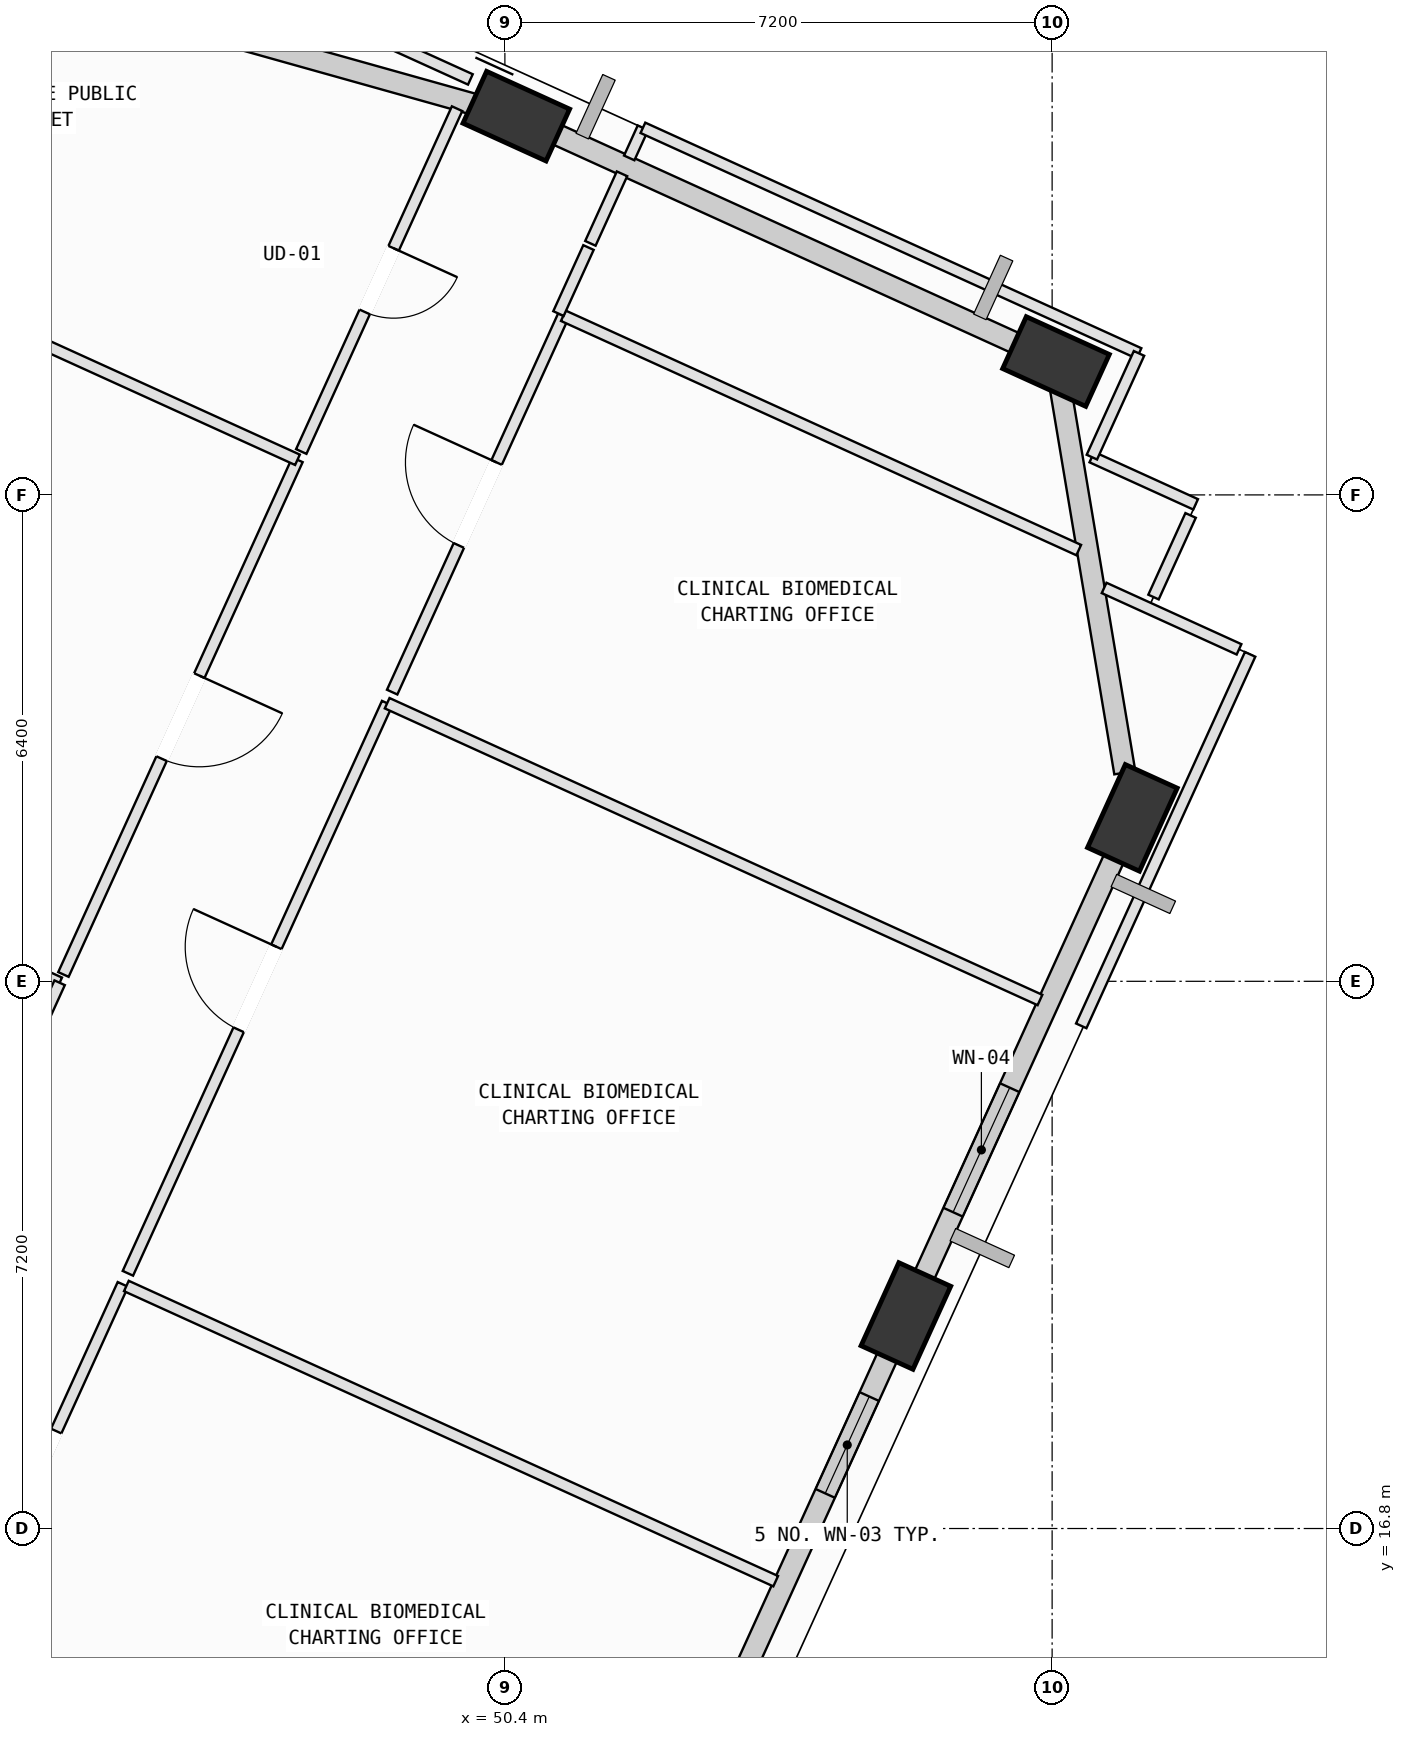
"""IFC4 building model, lengths in metres.
Left out: names, types, materials, properties, quantities, classifications, styles, units other than length and angle.
Written with IfcOpenShell. Run it as: python <this file> out.ifc"""

import sys

from ifc_helpers import new_model, si_unit, direction, frame, frame_2d, origin, origin_2d, place, context, subcontext, project, spatial, rectangle, extrude, element, fill, save


model = new_model("IFC4")
c1 = context("Model", 3, precision=1e-05, world=origin(), true_north=direction((0.0, 1.0)))
c2 = subcontext(c1, "Body", "Model", "MODEL_VIEW")
j1 = project(units=[si_unit("LENGTHUNIT", "METRE"), si_unit("PLANEANGLEUNIT", "RADIAN")], contexts=[c1])
p1 = place(None, origin())
s1 = spatial("IfcSite", under=j1, at=p1, CompositionType="ELEMENT")
p2 = place(p1, origin())
s2 = spatial("IfcBuilding", under=s1, at=p2, CompositionType="ELEMENT")
p3 = place(p2, frame((0.0, 0.0, 304.6)))
s3 = spatial("IfcBuildingStorey", under=s2, at=p3, CompositionType="ELEMENT", Elevation=304.6)
p4 = place(p3, frame((55.676, 19.596, 0.002), z_axis=(0.020720058133, 0.091230106706, 0.995614256036), x_axis=(-0.604352384833, -0.792152328195, 0.085163864882)))
e1 = element("IfcColumn", 1, at=p4, inside=s3, PredefinedType="COLUMN", context=c2, shape_type="SweptSolid", body=[
    extrude(rectangle(XDim=1.2, YDim=0.75, at=origin_2d()), origin(), (0.0, 0.0, 1.0), 3.947),
])
p5 = place(p3, frame((58.656, 26.151, 0.002), z_axis=(-0.006437366852, 0.103245460663, 0.994635076377), x_axis=(-0.356751992892, -0.929440786486, 0.094169209322)))
e2 = element("IfcColumn", 2, at=p5, inside=s3, PredefinedType="COLUMN", context=c2, shape_type="SweptSolid", body=[
    extrude(rectangle(XDim=1.2, YDim=0.75, at=origin_2d()), origin(), (0.0, 0.0, 1.0), 3.944),
])
p6 = place(p3, frame((57.651, 32.155, 0.002), z_axis=(-0.031104647589, 0.098930059692, 0.994608135995), x_axis=(0.991884646195, -0.119676409496, 0.042923253047)))
e3 = element("IfcColumn", 3, at=p6, inside=s3, PredefinedType="COLUMN", context=c2, shape_type="SweptSolid", body=[
    extrude(rectangle(XDim=1.2, YDim=0.75, at=origin_2d()), origin(), (0.0, 0.0, 1.0), 3.956),
])
p7 = place(p3, frame((50.55, 35.383, 0.002), z_axis=(-0.044259952808, 0.069657028792, 0.996588658834), x_axis=(0.989554992993, 0.140050346374, 0.034158693237)))
e4 = element("IfcColumn", 4, at=p7, inside=s3, PredefinedType="COLUMN", context=c2, shape_type="SweptSolid", body=[
    extrude(rectangle(XDim=1.2, YDim=0.75, at=origin_2d()), origin(), (0.0, 0.0, 1.0), 3.96),
])
p8 = place(p3, frame((55.588, 19.404, 0.0), z_axis=(0.0, 0.0, 1.0), x_axis=(-0.413909168945, -0.910318186055, 0.0)))
e5 = element("IfcWall", 5, at=p8, inside=s3, PredefinedType="SOLIDWALL", context=c2, shape_type="SweptSolid", body=[
    extrude(rectangle(XDim=6.407, YDim=0.28, at=frame_2d((3.203, 0.0))), origin(), (0.0, 0.0, 1.0), 3.265),
])
p9 = place(p8, frame((0.952, 0.0, 0.75)))
e6 = element("IfcOpeningElement", 6, at=p9, cuts=e5, PredefinedType="OPENING", context=c2, shape_type="SweptSolid", body=[
    extrude(rectangle(XDim=1.4, YDim=1.85, at=frame_2d((0.7, 0.925))), frame((0.0, 0.15, 0.0), z_axis=(0.0, -1.0, 0.0), x_axis=(1.0, 0.0, 0.0)), (0.0, 0.0, 1.0), 0.3),
])
p10 = place(p3, frame((58.573, 25.967, 0.0), z_axis=(0.0, 0.0, 1.0), x_axis=(-0.4139233057, -0.910311758135, 0.0)))
e7 = element("IfcWall", 7, at=p10, inside=s3, PredefinedType="SOLIDWALL", context=c2, shape_type="SweptSolid", body=[
    extrude(rectangle(XDim=6.418, YDim=0.28, at=frame_2d((3.209, 0.0))), origin(), (0.0, 0.0, 1.0), 3.265),
])
p11 = place(p10, frame((3.698, 0.0, 0.75)))
e8 = element("IfcOpeningElement", 8, at=p11, cuts=e7, PredefinedType="OPENING", context=c2, shape_type="SweptSolid", body=[
    extrude(rectangle(XDim=1.8, YDim=2.05, at=frame_2d((0.9, 1.025))), frame((0.0, 0.15, 0.0), z_axis=(0.0, -1.0, 0.0), x_axis=(1.0, 0.0, 0.0)), (0.0, 0.0, 1.0), 0.3),
])
p12 = place(p3, frame((57.682, 31.968, 0.0), z_axis=(0.0, 0.0, 1.0), x_axis=(0.165049562629, -0.986285274085, 0.0)))
e9 = element("IfcWall", 9, at=p12, inside=s3, PredefinedType="SOLIDWALL", context=c2, shape_type="SweptSolid", body=[
    extrude(rectangle(XDim=5.294, YDim=0.28, at=frame_2d((2.647, 0.0))), origin(), (0.0, 0.0, 1.0), 3.265),
])
p13 = place(p3, frame((50.777, 35.281, 0.0), z_axis=(0.0, 0.0, 1.0), x_axis=(0.910317820998, -0.413909971821, 0.0)))
e10 = element("IfcWall", 10, at=p13, inside=s3, PredefinedType="SOLIDWALL", context=c2, shape_type="SweptSolid", body=[
    extrude(rectangle(XDim=7.046, YDim=0.28, at=frame_2d((3.523, 0.0))), origin(), (0.0, 0.0, 1.0), 3.265),
])
p14 = place(p3, frame((41.363, 37.959, 0.0), z_axis=(0.0, 0.0, 1.0), x_axis=(0.962879231583, -0.269932557107, 0.0)))
e11 = element("IfcWall", 11, at=p14, inside=s3, PredefinedType="SOLIDWALL", context=c2, shape_type="SweptSolid", body=[
    extrude(rectangle(XDim=9.036, YDim=0.28, at=frame_2d((4.518, 0.0))), origin(), (0.0, 0.0, 1.0), 3.265),
])
p15 = place(p3, frame((43.123, 15.06, 0.0), z_axis=(0.0, 0.0, 1.0), x_axis=(0.413819852152, 0.910358791887, 0.0)))
e12 = element("IfcWall", 12, at=p15, inside=s3, PredefinedType="PARTITIONING", context=c2, shape_type="SweptSolid", body=[
    extrude(rectangle(XDim=5.439, YDim=0.15, at=frame_2d((2.72, 0.0))), origin(), (0.0, 0.0, 1.0), 3.78),
])
p16 = place(p15, frame((2.12, 0.0, 0.0)))
e13 = element("IfcOpeningElement", 13, at=p16, cuts=e12, PredefinedType="OPENING", context=c2, shape_type="SweptSolid", body=[
    extrude(rectangle(XDim=1.2, YDim=2.15, at=frame_2d((0.6, 1.075))), frame((0.0, 0.085, 0.0), z_axis=(0.0, -1.0, 0.0), x_axis=(1.0, 0.0, 0.0)), (0.0, 0.0, 1.0), 0.17),
])
p17 = place(p3, frame((45.42, 19.991, 0.0), z_axis=(0.0, 0.0, 1.0), x_axis=(0.910331727625, -0.413879385425, 0.0)))
e14 = element("IfcWall", 14, at=p17, inside=s3, PredefinedType="PARTITIONING", context=c2, shape_type="SweptSolid", body=[
    extrude(rectangle(XDim=9.385, YDim=0.15, at=frame_2d((4.692, 0.0))), origin(), (0.0, 0.0, 1.0), 3.78),
])
p18 = place(p3, frame((45.44, 20.158, 0.0), z_axis=(0.0, 0.0, 1.0), x_axis=(0.413963660089, 0.910293407713, 0.0)))
e15 = element("IfcWall", 15, at=p18, inside=s3, PredefinedType="PARTITIONING", context=c2, shape_type="SweptSolid", body=[
    extrude(rectangle(XDim=8.24, YDim=0.15, at=frame_2d((4.12, 0.0))), origin(), (0.0, 0.0, 1.0), 3.415),
])
p19 = place(p18, frame((3.52, 0.0, 0.0)))
e16 = element("IfcOpeningElement", 16, at=p19, cuts=e15, PredefinedType="OPENING", context=c2, shape_type="SweptSolid", body=[
    extrude(rectangle(XDim=1.2, YDim=2.15, at=frame_2d((0.6, 1.075))), frame((0.0, 0.085, 0.0), z_axis=(0.0, -1.0, 0.0), x_axis=(1.0, 0.0, 0.0)), (0.0, 0.0, 1.0), 0.17),
])
p20 = place(p3, frame((48.851, 27.659, 0.0), z_axis=(0.0, 0.0, 1.0), x_axis=(0.910326595448, -0.413890673513, 0.0)))
e17 = element("IfcWall", 17, at=p20, inside=s3, PredefinedType="PARTITIONING", context=c2, shape_type="SweptSolid", body=[
    extrude(rectangle(XDim=9.435, YDim=0.15, at=frame_2d((4.717, 0.0))), origin(), (0.0, 0.0, 1.0), 3.78),
])
p21 = place(p3, frame((56.125, 20.029, 0.0), z_axis=(0.0, 0.0, 1.0), x_axis=(-0.413988734236, -0.910282004615, 0.0)))
e18 = element("IfcWall", 18, at=p21, inside=s3, PredefinedType="PARTITIONING", context=c2, shape_type="SweptSolid", body=[
    extrude(rectangle(XDim=0.792, YDim=0.15, at=frame_2d((0.396, 0.0))), origin(), (0.0, 0.0, 1.0), 3.265),
])
p22 = place(p3, frame((48.917, 27.805, 0.0), z_axis=(0.0, 0.0, 1.0), x_axis=(0.413951711355, 0.910298841406, 0.0)))
e19 = element("IfcWall", 19, at=p22, inside=s3, PredefinedType="PARTITIONING", context=c2, shape_type="SweptSolid", body=[
    extrude(rectangle(XDim=5.44, YDim=0.15, at=frame_2d((2.72, 0.0))), origin(), (0.0, 0.0, 1.0), 3.78),
])
p23 = place(p22, frame((2.12, 0.0, 0.0)))
e20 = element("IfcOpeningElement", 20, at=p23, cuts=e19, PredefinedType="OPENING", context=c2, shape_type="SweptSolid", body=[
    extrude(rectangle(XDim=1.2, YDim=2.15, at=frame_2d((0.6, 1.075))), frame((0.0, 0.085, 0.0), z_axis=(0.0, -1.0, 0.0), x_axis=(1.0, 0.0, 0.0)), (0.0, 0.0, 1.0), 0.17),
])
p24 = place(p3, frame((51.169, 32.757, 0.0), z_axis=(0.0, 0.0, 1.0), x_axis=(0.910329433421, -0.413884431512, 0.0)))
e21 = element("IfcWall", 21, at=p24, inside=s3, PredefinedType="PARTITIONING", context=c2, shape_type="SweptSolid", body=[
    extrude(rectangle(XDim=7.449, YDim=0.15, at=frame_2d((3.725, 0.0))), origin(), (0.0, 0.0, 1.0), 3.78),
])
p25 = place(p3, frame((58.284, 29.176, 0.0), z_axis=(0.0, 0.0, 1.0), x_axis=(0.910130559236, -0.414321572146, 0.0)))
e22 = element("IfcWall", 22, at=p25, inside=s3, PredefinedType="PARTITIONING", context=c2, shape_type="SweptSolid", body=[
    extrude(rectangle(XDim=1.95, YDim=0.15, at=frame_2d((0.975, 0.0))), origin(), (0.0, 0.0, 1.0), 3.78),
])
p26 = place(p3, frame((36.5, 27.638, 0.0), z_axis=(0.0, 0.0, 1.0), x_axis=(0.910301163937, -0.413946603965, 0.0)))
e23 = element("IfcWall", 23, at=p26, inside=s3, PredefinedType="PARTITIONING", context=c2, shape_type="SweptSolid", body=[
    extrude(rectangle(XDim=8.834, YDim=0.15, at=frame_2d((4.417, 0.0))), origin(), (0.0, 0.0, 1.0), 3.78),
])
p27 = place(p3, frame((44.542, 23.981, 0.0), z_axis=(0.0, 0.0, 1.0), x_axis=(-0.413833170361, -0.910352737739, 0.0)))
e24 = element("IfcWall", 24, at=p27, inside=s3, PredefinedType="PARTITIONING", context=c2, shape_type="SweptSolid", body=[
    extrude(rectangle(XDim=11.562, YDim=0.15, at=frame_2d((5.781, 0.0))), origin(), (0.0, 0.0, 1.0), 3.78),
])
p28 = place(p27, frame((5.181, 0.0, 0.0)))
e25 = element("IfcOpeningElement", 25, at=p28, cuts=e24, PredefinedType="OPENING", context=c2, shape_type="SweptSolid", body=[
    extrude(rectangle(XDim=1.2, YDim=2.15, at=frame_2d((0.6, 1.075))), frame((0.0, 0.085, 0.0), z_axis=(0.0, -1.0, 0.0), x_axis=(1.0, 0.0, 0.0)), (0.0, 0.0, 1.0), 0.17),
])
p29 = place(p3, frame((47.671, 30.862, 0.0), z_axis=(0.0, 0.0, 1.0), x_axis=(-0.41387959528, -0.910331632215, 0.0)))
e26 = element("IfcWall", 26, at=p29, inside=s3, PredefinedType="PARTITIONING", context=c2, shape_type="SweptSolid", body=[
    extrude(rectangle(XDim=7.439, YDim=0.15, at=frame_2d((3.719, 0.0))), origin(), (0.0, 0.0, 1.0), 3.78),
])
p30 = place(p29, frame((3.12, 0.0, 0.0)))
e27 = element("IfcOpeningElement", 27, at=p30, cuts=e26, PredefinedType="OPENING", context=c2, shape_type="SweptSolid", body=[
    extrude(rectangle(XDim=1.2, YDim=2.15, at=frame_2d((0.6, 1.075))), frame((0.0, 0.085, 0.0), z_axis=(0.0, -1.0, 0.0), x_axis=(1.0, 0.0, 0.0)), (0.0, 0.0, 1.0), 0.17),
])
p31 = place(p3, frame((39.628, 34.519, 0.0), z_axis=(0.0, 0.0, 1.0), x_axis=(0.910320102394, -0.413904954279, 0.0)))
e28 = element("IfcWall", 28, at=p31, inside=s3, PredefinedType="PARTITIONING", context=c2, shape_type="SweptSolid", body=[
    extrude(rectangle(XDim=8.835, YDim=0.15, at=frame_2d((4.417, 0.0))), origin(), (0.0, 0.0, 1.0), 3.78),
])
p32 = place(p3, frame((42.664, 39.178, 0.0), z_axis=(0.0, 0.0, 1.0), x_axis=(0.910317346535, -0.413911015312, 0.0)))
e29 = element("IfcWall", 29, at=p32, inside=s3, PredefinedType="PARTITIONING", context=c2, shape_type="SweptSolid", body=[
    extrude(rectangle(XDim=7.999, YDim=0.15, at=frame_2d((4.0, 0.0))), origin(), (0.0, 0.0, 1.0), 3.265),
])
p33 = place(p3, frame((49.771, 35.482, 0.0), z_axis=(0.0, 0.0, 1.0), x_axis=(-0.413736122394, -0.910396848098, 0.0)))
e30 = element("IfcWall", 30, at=p33, inside=s3, PredefinedType="PARTITIONING", context=c2, shape_type="SweptSolid", body=[
    extrude(rectangle(XDim=4.955, YDim=0.15, at=frame_2d((2.478, 0.0))), origin(), (0.0, 0.0, 1.0), 2.765),
])
p34 = place(p33, frame((2.018, 0.0, 0.0)))
e31 = element("IfcOpeningElement", 31, at=p34, cuts=e30, PredefinedType="OPENING", context=c2, shape_type="SweptSolid", body=[
    extrude(rectangle(XDim=0.92, YDim=2.1, at=frame_2d((0.46, 1.05))), frame((0.0, 0.085, 0.0), z_axis=(0.0, -1.0, 0.0), x_axis=(1.0, 0.0, 0.0)), (0.0, 0.0, 1.0), 0.17),
])
p35 = place(p3, frame((60.205, 28.302, 0.0), z_axis=(0.0, 0.0, 1.0), x_axis=(-0.413861181476, -0.910340003772, 0.0)))
e32 = element("IfcWall", 32, at=p35, inside=s3, PredefinedType="PARTITIONING", context=c2, shape_type="SweptSolid", body=[
    extrude(rectangle(XDim=5.369, YDim=0.15, at=frame_2d((2.685, 0.0))), origin(), (0.0, 0.0, 1.0), 3.78),
])
p36 = place(p3, frame((51.105, 32.786, 0.0), z_axis=(0.0, 0.0, 1.0), x_axis=(0.4137644099, 0.910383992116, 0.0)))
e33 = element("IfcWall", 33, at=p36, inside=s3, PredefinedType="PARTITIONING", context=c2, shape_type="SweptSolid", body=[
    extrude(rectangle(XDim=0.955, YDim=0.15, at=frame_2d((0.477, 0.0))), origin(), (0.0, 0.0, 1.0), 3.78),
])
p37 = place(p3, frame((59.422, 30.13, 0.0), z_axis=(0.0, 0.0, 1.0), x_axis=(-0.413709385682, -0.910408998307, 0.0)))
e34 = element("IfcWall", 34, at=p37, inside=s3, PredefinedType="PARTITIONING", context=c2, shape_type="SweptSolid", body=[
    extrude(rectangle(XDim=1.18, YDim=0.15, at=frame_2d((0.59, 0.0))), origin(), (0.0, 0.0, 1.0), 3.78),
])
p38 = place(p3, frame((58.123, 30.897, 0.0), z_axis=(0.0, 0.0, 1.0), x_axis=(0.91020472483, -0.414158615626, 0.0)))
e35 = element("IfcWall", 35, at=p38, inside=s3, PredefinedType="PARTITIONING", context=c2, shape_type="SweptSolid", body=[
    extrude(rectangle(XDim=1.5, YDim=0.15, at=frame_2d((0.75, 0.0))), origin(), (0.0, 0.0, 1.0), 3.78),
])
p39 = place(p3, frame((51.525, 33.71, 0.0), z_axis=(0.0, 0.0, 1.0), x_axis=(0.413876141201, 0.910333202594, 0.0)))
e36 = element("IfcWall", 36, at=p39, inside=s3, PredefinedType="PARTITIONING", context=c2, shape_type="SweptSolid", body=[
    extrude(rectangle(XDim=1.005, YDim=0.15, at=frame_2d((0.502, 0.0))), origin(), (0.0, 0.0, 1.0), 3.78),
])
p40 = place(p3, frame((52.036, 34.834, 0.0), z_axis=(0.0, 0.0, 1.0), x_axis=(0.414141153308, 0.910212670279, 0.0)))
e37 = element("IfcWall", 37, at=p40, inside=s3, PredefinedType="PARTITIONING", context=c2, shape_type="SweptSolid", body=[
    extrude(rectangle(XDim=0.435, YDim=0.15, at=frame_2d((0.218, 0.0))), origin(), (0.0, 0.0, 1.0), 3.78),
])
p41 = place(p3, frame((52.216, 35.23, 0.0), z_axis=(0.0, 0.0, 1.0), x_axis=(0.91029999772, -0.41394916856, 0.0)))
e38 = element("IfcWall", 38, at=p41, inside=s3, PredefinedType="PARTITIONING", context=c2, shape_type="SweptSolid", body=[
    extrude(rectangle(XDim=7.17, YDim=0.15, at=frame_2d((3.585, 0.0))), origin(), (0.0, 0.0, 1.0), 3.265),
])
p42 = place(p3, frame((58.743, 32.262, 0.0), z_axis=(0.0, 0.0, 1.0), x_axis=(-0.413483905377, -0.910511427712, 0.0)))
e39 = element("IfcWall", 39, at=p42, inside=s3, PredefinedType="PARTITIONING", context=c2, shape_type="SweptSolid", body=[
    extrude(rectangle(XDim=1.499, YDim=0.15, at=frame_2d((0.75, 0.0))), origin(), (0.0, 0.0, 1.0), 3.78),
])
p43 = place(p9, origin())
e40 = element("IfcWindow", 40, at=p43, inside=s3, PartitioningType="SINGLE_PANEL", PredefinedType="WINDOW", context=c2, shape_type="SweptSolid", body=[
    extrude(rectangle(XDim=1.4, YDim=1.85, at=frame_2d((0.7, 0.925))), frame((0.0, 0.03, 0.0), z_axis=(0.0, -1.0, 0.0), x_axis=(1.0, 0.0, 0.0)), (0.0, 0.0, 1.0), 0.06),
])
fill(e6, e40)
p44 = place(p11, origin())
e41 = element("IfcWindow", 41, at=p44, inside=s3, PartitioningType="SINGLE_PANEL", PredefinedType="WINDOW", context=c2, shape_type="SweptSolid", body=[
    extrude(rectangle(XDim=1.8, YDim=2.05, at=frame_2d((0.9, 1.025))), frame((0.0, 0.03, 0.0), z_axis=(0.0, -1.0, 0.0), x_axis=(1.0, 0.0, 0.0)), (0.0, 0.0, 1.0), 0.06),
])
fill(e8, e41)
p45 = place(p16, origin())
e42 = element("IfcDoor", 42, at=p45, inside=s3, OperationType="SINGLE_SWING_LEFT", PredefinedType="DOOR", context=c2, shape_type="SweptSolid", body=[
    extrude(rectangle(XDim=1.2, YDim=2.15, at=frame_2d((0.6, 1.075))), frame((0.0, 0.025, 0.0), z_axis=(0.0, -1.0, 0.0), x_axis=(1.0, 0.0, 0.0)), (0.0, 0.0, 1.0), 0.05),
])
fill(e13, e42)
p46 = place(p19, origin())
e43 = element("IfcDoor", 43, at=p46, inside=s3, OperationType="SINGLE_SWING_RIGHT", PredefinedType="DOOR", context=c2, shape_type="SweptSolid", body=[
    extrude(rectangle(XDim=1.2, YDim=2.15, at=frame_2d((0.6, 1.075))), frame((0.0, 0.025, 0.0), z_axis=(0.0, -1.0, 0.0), x_axis=(1.0, 0.0, 0.0)), (0.0, 0.0, 1.0), 0.05),
])
fill(e16, e43)
p47 = place(p23, origin())
e44 = element("IfcDoor", 44, at=p47, inside=s3, OperationType="SINGLE_SWING_RIGHT", PredefinedType="DOOR", context=c2, shape_type="SweptSolid", body=[
    extrude(rectangle(XDim=1.2, YDim=2.15, at=frame_2d((0.6, 1.075))), frame((0.0, 0.025, 0.0), z_axis=(0.0, -1.0, 0.0), x_axis=(1.0, 0.0, 0.0)), (0.0, 0.0, 1.0), 0.05),
])
fill(e20, e44)
p48 = place(p30, origin())
e45 = element("IfcDoor", 45, at=p48, inside=s3, OperationType="SINGLE_SWING_LEFT", PredefinedType="DOOR", context=c2, shape_type="SweptSolid", body=[
    extrude(rectangle(XDim=1.2, YDim=2.15, at=frame_2d((0.6, 1.075))), frame((0.0, 0.025, 0.0), z_axis=(0.0, -1.0, 0.0), x_axis=(1.0, 0.0, 0.0)), (0.0, 0.0, 1.0), 0.05),
])
fill(e27, e45)
p49 = place(p34, origin())
e46 = element("IfcDoor", 46, at=p49, inside=s3, OperationType="SINGLE_SWING_LEFT", PredefinedType="DOOR", context=c2, shape_type="SweptSolid", body=[
    extrude(rectangle(XDim=0.92, YDim=2.1, at=frame_2d((0.46, 1.05))), frame((0.0, 0.025, 0.0), z_axis=(0.0, -1.0, 0.0), x_axis=(1.0, 0.0, 0.0)), (0.0, 0.0, 1.0), 0.05),
])
fill(e31, e46)
save(model, sys.argv[1])
